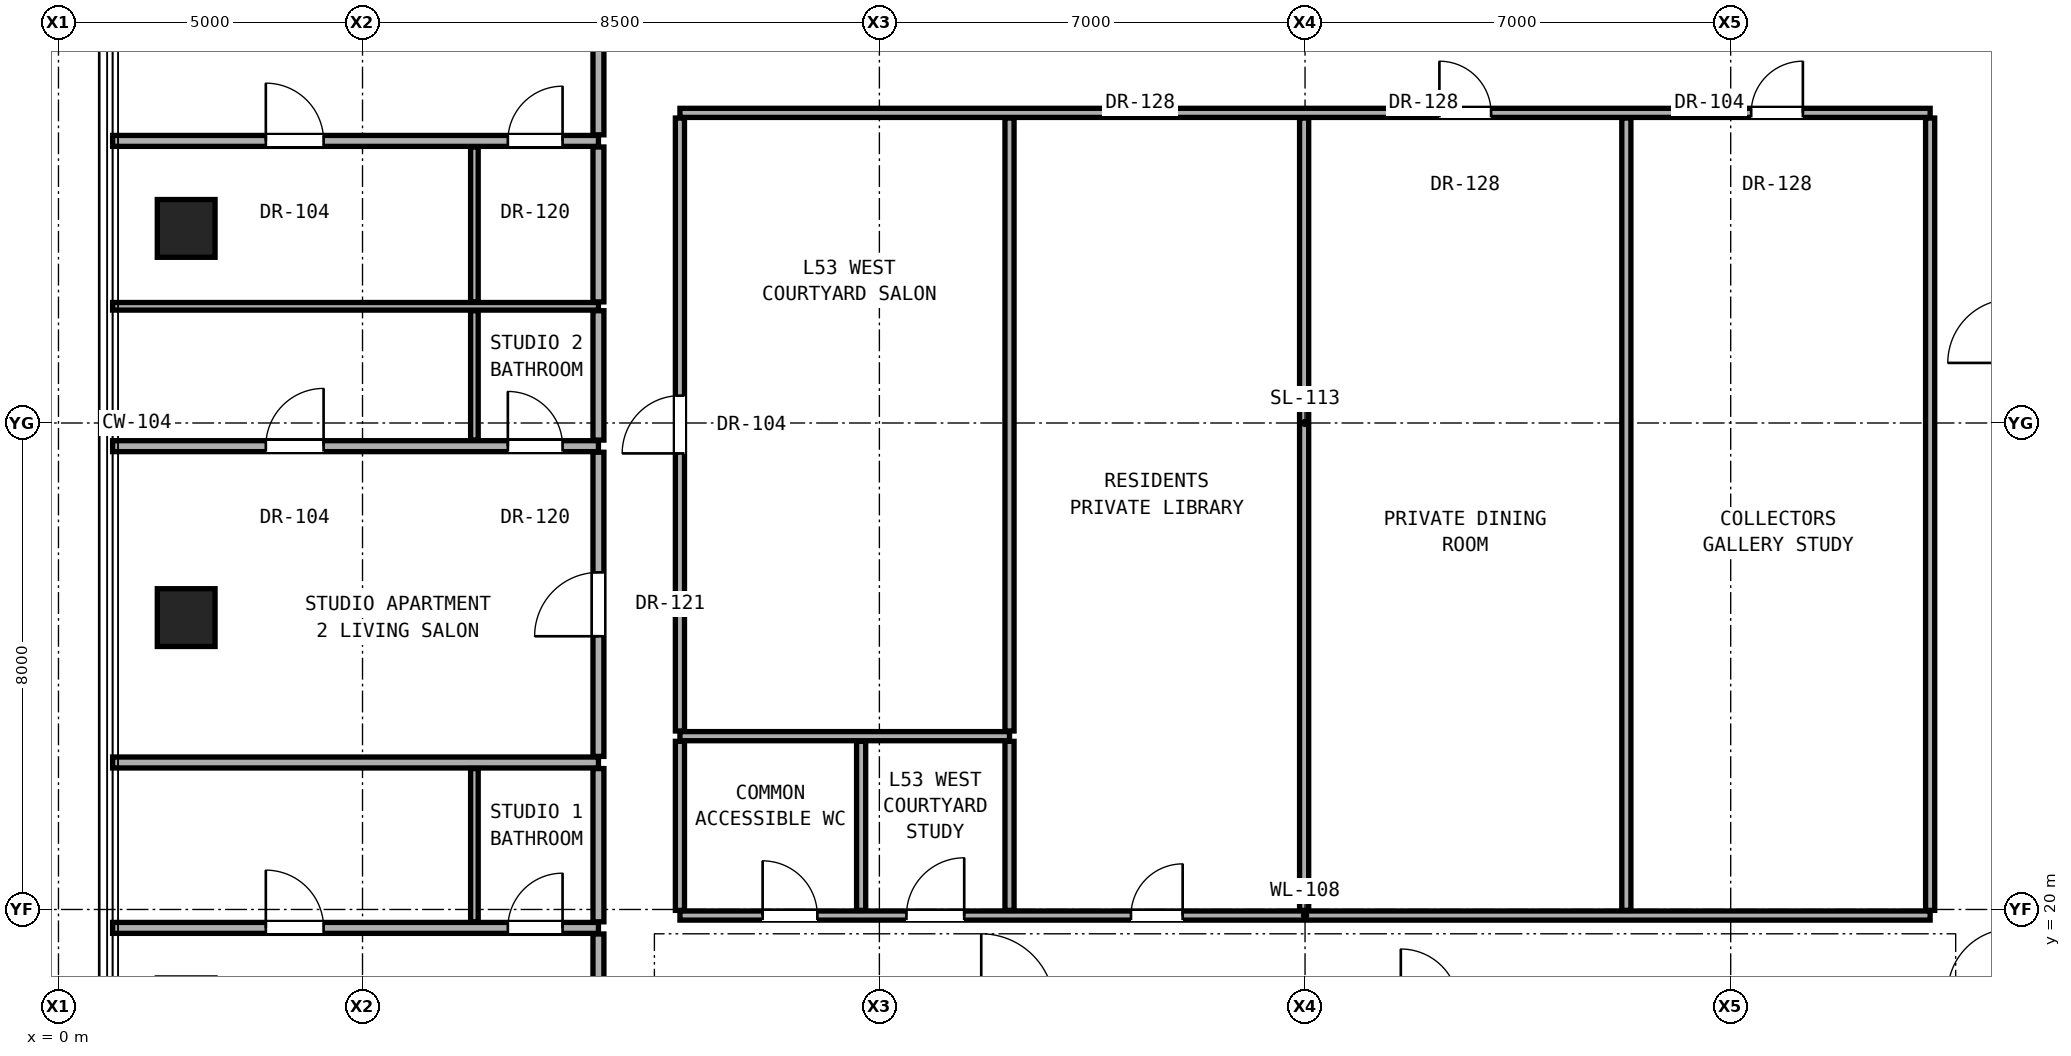
"""IFC4 building model, lengths in metres.
Left out: names, types, materials, properties, quantities, classifications, styles, units other than length and angle.
Written with IfcOpenShell. Run it as: python <this file> out.ifc"""

import sys

from ifc_helpers import new_model, si_unit, direction, frame, frame_2d, origin, origin_2d, place, context, subcontext, project, spatial, rectangle, hollow_rectangle, extrude, element, fill, save


model = new_model("IFC4")
c1 = context("Model", 3, precision=1e-05, world=origin(), true_north=direction((0.0, 1.0)))
c2 = subcontext(c1, "Body", "Model", "MODEL_VIEW")
j1 = project(units=[si_unit("LENGTHUNIT", "METRE"), si_unit("PLANEANGLEUNIT", "RADIAN")], contexts=[c1])
p1 = place(None, origin())
s1 = spatial("IfcSite", under=j1, at=p1, CompositionType="ELEMENT")
p2 = place(p1, origin())
s2 = spatial("IfcBuilding", under=s1, at=p2, CompositionType="ELEMENT")
p3 = place(p2, frame((0.0, 0.0, 186.9)))
s3 = spatial("IfcBuildingStorey", under=s2, at=p3, CompositionType="ELEMENT", Elevation=186.9)
for number, where, z_axis, x_axis in (
    (1, (2.1, 24.8, 0.0), (0.0, 0.0, 1.0), (1.0, 0.0, 0.0)),
    (2, (2.1, 31.2, 0.0), (0.0, 0.0, 1.0), (1.0, 0.0, 0.0)),
):
    element("IfcColumn", number, at=place(p3, frame(where, z_axis=z_axis, x_axis=x_axis)), inside=s3, PredefinedType="COLUMN", context=c2, shape_type="SweptSolid", body=[
        extrude(hollow_rectangle(XDim=0.95, YDim=0.95, WallThickness=0.05, at=origin_2d()), origin(), (0.0, 0.0, 1.0), 3.25),
    ])
p4 = place(p3, frame((0.89, 19.697, 0.0), z_axis=(0.0, 0.0, 1.0), x_axis=(1.0, 0.0, 0.0)))
e3 = element("IfcWall", 3, at=p4, inside=s3, PredefinedType="PARTITIONING", context=c2, shape_type="SweptSolid", body=[
    extrude(rectangle(XDim=7.99, YDim=0.18, at=frame_2d((3.995, 0.0))), origin(), (0.0, 0.0, 1.0), 2.269),
])
p5 = place(p4, frame((2.52, 0.0, 0.0)))
e4 = element("IfcOpeningElement", 4, at=p5, cuts=e3, PredefinedType="OPENING", context=c2, shape_type="SweptSolid", body=[
    extrude(rectangle(XDim=0.95, YDim=2.15, at=frame_2d((0.475, 1.075))), frame((0.0, 0.1, 0.0), z_axis=(0.0, -1.0, 0.0), x_axis=(1.0, 0.0, 0.0)), (0.0, 0.0, 1.0), 0.2),
])
p6 = place(p4, frame((6.5, 0.0, 0.0)))
e5 = element("IfcOpeningElement", 5, at=p6, cuts=e3, PredefinedType="OPENING", context=c2, shape_type="SweptSolid", body=[
    extrude(rectangle(XDim=0.9, YDim=2.1, at=frame_2d((0.45, 1.05))), frame((0.0, 0.1, 0.0), z_axis=(0.0, -1.0, 0.0), x_axis=(1.0, 0.0, 0.0)), (0.0, 0.0, 1.0), 0.2),
])
p7 = place(p3, frame((10.22, 19.9, 0.0), z_axis=(0.0, 0.0, 1.0), x_axis=(1.0, 0.0, 0.0)))
e6 = element("IfcWall", 6, at=p7, inside=s3, PredefinedType="PARTITIONING", context=c2, shape_type="SweptSolid", body=[
    extrude(rectangle(XDim=20.56, YDim=0.15, at=frame_2d((10.28, 0.0))), origin(), (0.0, 0.0, 1.0), 2.186),
])
p8 = place(p7, frame((1.36, 0.0, 0.0)))
e7 = element("IfcOpeningElement", 7, at=p8, cuts=e6, PredefinedType="OPENING", context=c2, shape_type="SweptSolid", body=[
    extrude(rectangle(XDim=0.9, YDim=2.1, at=frame_2d((0.45, 1.05))), frame((0.0, 0.085, 0.0), z_axis=(0.0, -1.0, 0.0), x_axis=(1.0, 0.0, 0.0)), (0.0, 0.0, 1.0), 0.17),
])
p9 = place(p7, frame((3.725, 0.0, 0.0)))
e8 = element("IfcOpeningElement", 8, at=p9, cuts=e6, PredefinedType="OPENING", context=c2, shape_type="SweptSolid", body=[
    extrude(rectangle(XDim=0.95, YDim=2.15, at=frame_2d((0.475, 1.075))), frame((0.0, 0.085, 0.0), z_axis=(0.0, -1.0, 0.0), x_axis=(1.0, 0.0, 0.0)), (0.0, 0.0, 1.0), 0.17),
])
p10 = place(p7, frame((7.417, 0.0, 0.0)))
e9 = element("IfcOpeningElement", 9, at=p10, cuts=e6, PredefinedType="OPENING", context=c2, shape_type="SweptSolid", body=[
    extrude(rectangle(XDim=0.85, YDim=2.01, at=frame_2d((0.425, 1.005))), frame((0.0, 0.085, 0.0), z_axis=(0.0, -1.0, 0.0), x_axis=(1.0, 0.0, 0.0)), (0.0, 0.0, 1.0), 0.17),
])
p11 = place(p3, frame((0.89, 22.417, 0.0), z_axis=(0.0, 0.0, 1.0), x_axis=(1.0, 0.0, 0.0)))
e10 = element("IfcWall", 10, at=p11, inside=s3, PredefinedType="PARTITIONING", context=c2, shape_type="SweptSolid", body=[
    extrude(rectangle(XDim=7.99, YDim=0.18, at=frame_2d((3.995, 0.0))), origin(), (0.0, 0.0, 1.0), 2.269),
])
p12 = place(p3, frame((10.22, 22.85, 0.0), z_axis=(0.0, 0.0, 1.0), x_axis=(1.0, 0.0, 0.0)))
e11 = element("IfcWall", 11, at=p12, inside=s3, PredefinedType="PARTITIONING", context=c2, shape_type="SweptSolid", body=[
    extrude(rectangle(XDim=5.42, YDim=0.15, at=frame_2d((2.71, 0.0))), origin(), (0.0, 0.0, 1.0), 2.186),
])
p13 = place(p3, frame((0.89, 27.619, 0.0), z_axis=(0.0, 0.0, 1.0), x_axis=(1.0, 0.0, 0.0)))
e12 = element("IfcWall", 12, at=p13, inside=s3, PredefinedType="PARTITIONING", context=c2, shape_type="SweptSolid", body=[
    extrude(rectangle(XDim=7.99, YDim=0.18, at=frame_2d((3.995, 0.0))), origin(), (0.0, 0.0, 1.0), 2.269),
])
p14 = place(p13, frame((2.52, 0.0, 0.0)))
e13 = element("IfcOpeningElement", 13, at=p14, cuts=e12, PredefinedType="OPENING", context=c2, shape_type="SweptSolid", body=[
    extrude(rectangle(XDim=0.95, YDim=2.15, at=frame_2d((0.475, 1.075))), frame((0.0, 0.1, 0.0), z_axis=(0.0, -1.0, 0.0), x_axis=(1.0, 0.0, 0.0)), (0.0, 0.0, 1.0), 0.2),
])
p15 = place(p13, frame((6.5, 0.0, 0.0)))
e14 = element("IfcOpeningElement", 14, at=p15, cuts=e12, PredefinedType="OPENING", context=c2, shape_type="SweptSolid", body=[
    extrude(rectangle(XDim=0.9, YDim=2.1, at=frame_2d((0.45, 1.05))), frame((0.0, 0.1, 0.0), z_axis=(0.0, -1.0, 0.0), x_axis=(1.0, 0.0, 0.0)), (0.0, 0.0, 1.0), 0.2),
])
p16 = place(p3, frame((0.89, 29.919, 0.0), z_axis=(0.0, 0.0, 1.0), x_axis=(1.0, 0.0, 0.0)))
e15 = element("IfcWall", 15, at=p16, inside=s3, PredefinedType="PARTITIONING", context=c2, shape_type="SweptSolid", body=[
    extrude(rectangle(XDim=7.99, YDim=0.125, at=frame_2d((3.995, 0.0))), origin(), (0.0, 0.0, 1.0), 2.269),
])
p17 = place(p3, frame((0.89, 32.639, 0.0), z_axis=(0.0, 0.0, 1.0), x_axis=(1.0, 0.0, 0.0)))
e16 = element("IfcWall", 16, at=p17, inside=s3, PredefinedType="PARTITIONING", context=c2, shape_type="SweptSolid", body=[
    extrude(rectangle(XDim=7.99, YDim=0.18, at=frame_2d((3.995, 0.0))), origin(), (0.0, 0.0, 1.0), 2.269),
])
p18 = place(p17, frame((2.52, 0.0, 0.0)))
e17 = element("IfcOpeningElement", 17, at=p18, cuts=e16, PredefinedType="OPENING", context=c2, shape_type="SweptSolid", body=[
    extrude(rectangle(XDim=0.95, YDim=2.15, at=frame_2d((0.475, 1.075))), frame((0.0, 0.1, 0.0), z_axis=(0.0, -1.0, 0.0), x_axis=(1.0, 0.0, 0.0)), (0.0, 0.0, 1.0), 0.2),
])
p19 = place(p17, frame((6.5, 0.0, 0.0)))
e18 = element("IfcOpeningElement", 18, at=p19, cuts=e16, PredefinedType="OPENING", context=c2, shape_type="SweptSolid", body=[
    extrude(rectangle(XDim=0.9, YDim=2.1, at=frame_2d((0.45, 1.05))), frame((0.0, 0.1, 0.0), z_axis=(0.0, -1.0, 0.0), x_axis=(1.0, 0.0, 0.0)), (0.0, 0.0, 1.0), 0.2),
])
p20 = place(p3, frame((10.22, 33.1, 0.0), z_axis=(0.0, 0.0, 1.0), x_axis=(1.0, 0.0, 0.0)))
e19 = element("IfcWall", 19, at=p20, inside=s3, PredefinedType="PARTITIONING", context=c2, shape_type="SweptSolid", body=[
    extrude(rectangle(XDim=20.56, YDim=0.15, at=frame_2d((10.28, 0.0))), origin(), (0.0, 0.0, 1.0), 2.186),
])
p21 = place(p20, frame((12.49, 0.0, 0.0)))
e20 = element("IfcOpeningElement", 20, at=p21, cuts=e19, PredefinedType="OPENING", context=c2, shape_type="SweptSolid", body=[
    extrude(rectangle(XDim=0.85, YDim=2.01, at=frame_2d((0.425, 1.005))), frame((0.0, 0.085, 0.0), z_axis=(0.0, -1.0, 0.0), x_axis=(1.0, 0.0, 0.0)), (0.0, 0.0, 1.0), 0.17),
])
p22 = place(p20, frame((17.617, 0.0, 0.0)))
e21 = element("IfcOpeningElement", 21, at=p22, cuts=e19, PredefinedType="OPENING", context=c2, shape_type="SweptSolid", body=[
    extrude(rectangle(XDim=0.85, YDim=2.01, at=frame_2d((0.425, 1.005))), frame((0.0, 0.085, 0.0), z_axis=(0.0, -1.0, 0.0), x_axis=(1.0, 0.0, 0.0)), (0.0, 0.0, 1.0), 0.17),
])
p23 = place(p3, frame((6.84, 19.797, 0.0), z_axis=(0.0, 0.0, 1.0), x_axis=(0.0, 1.0, 0.0)))
e22 = element("IfcWall", 22, at=p23, inside=s3, PredefinedType="PARTITIONING", context=c2, shape_type="SweptSolid", body=[
    extrude(rectangle(XDim=2.52, YDim=0.125, at=frame_2d((1.26, 0.0))), origin(), (0.0, 0.0, 1.0), 3.05),
])
p24 = place(p3, frame((6.84, 27.719, 0.0), z_axis=(0.0, 0.0, 1.0), x_axis=(0.0, 1.0, 0.0)))
e23 = element("IfcWall", 23, at=p24, inside=s3, PredefinedType="PARTITIONING", context=c2, shape_type="SweptSolid", body=[
    extrude(rectangle(XDim=2.127, YDim=0.125, at=frame_2d((1.064, 0.0))), origin(), (0.0, 0.0, 1.0), 3.05),
])
p25 = place(p3, frame((6.84, 29.991, 0.0), z_axis=(0.0, 0.0, 1.0), x_axis=(0.0, 1.0, 0.0)))
e24 = element("IfcWall", 24, at=p25, inside=s3, PredefinedType="PARTITIONING", context=c2, shape_type="SweptSolid", body=[
    extrude(rectangle(XDim=2.548, YDim=0.125, at=frame_2d((1.274, 0.0))), origin(), (0.0, 0.0, 1.0), 2.346),
])
p26 = place(p3, frame((8.88, 15.227, 0.0), z_axis=(0.0, 0.0, 1.0), x_axis=(0.0, 1.0, 0.0)))
e25 = element("IfcWall", 25, at=p26, inside=s3, PredefinedType="PARTITIONING", context=c2, shape_type="SweptSolid", body=[
    extrude(rectangle(XDim=4.37, YDim=0.18, at=frame_2d((2.185, 0.0))), origin(), (0.0, 0.0, 1.0), 2.442),
])
p27 = place(p26, frame((1.66, 0.0, 0.0)))
e26 = element("IfcOpeningElement", 26, at=p27, cuts=e25, PredefinedType="OPENING", context=c2, shape_type="SweptSolid", body=[
    extrude(rectangle(XDim=1.05, YDim=2.2, at=frame_2d((0.525, 1.1))), frame((0.0, 0.1, 0.0), z_axis=(0.0, -1.0, 0.0), x_axis=(1.0, 0.0, 0.0)), (0.0, 0.0, 1.0), 0.2),
])
p28 = place(p3, frame((8.88, 19.797, 0.0), z_axis=(0.0, 0.0, 1.0), x_axis=(0.0, 1.0, 0.0)))
e27 = element("IfcWall", 27, at=p28, inside=s3, PredefinedType="PARTITIONING", context=c2, shape_type="SweptSolid", body=[
    extrude(rectangle(XDim=2.52, YDim=0.18, at=frame_2d((1.26, 0.0))), origin(), (0.0, 0.0, 1.0), 3.05),
])
p29 = place(p3, frame((8.88, 22.517, 0.0), z_axis=(0.0, 0.0, 1.0), x_axis=(0.0, 1.0, 0.0)))
e28 = element("IfcWall", 28, at=p29, inside=s3, PredefinedType="PARTITIONING", context=c2, shape_type="SweptSolid", body=[
    extrude(rectangle(XDim=5.002, YDim=0.18, at=frame_2d((2.501, 0.0))), origin(), (0.0, 0.0, 1.0), 2.346),
])
p30 = place(p29, frame((1.976, 0.0, 0.0)))
e29 = element("IfcOpeningElement", 29, at=p30, cuts=e28, PredefinedType="OPENING", context=c2, shape_type="SweptSolid", body=[
    extrude(rectangle(XDim=1.05, YDim=2.2, at=frame_2d((0.525, 1.1))), frame((0.0, 0.1, 0.0), z_axis=(0.0, -1.0, 0.0), x_axis=(1.0, 0.0, 0.0)), (0.0, 0.0, 1.0), 0.2),
])
p31 = place(p3, frame((8.88, 27.719, 0.0), z_axis=(0.0, 0.0, 1.0), x_axis=(0.0, 1.0, 0.0)))
e30 = element("IfcWall", 30, at=p31, inside=s3, PredefinedType="PARTITIONING", context=c2, shape_type="SweptSolid", body=[
    extrude(rectangle(XDim=2.127, YDim=0.18, at=frame_2d((1.064, 0.0))), origin(), (0.0, 0.0, 1.0), 3.05),
])
p32 = place(p3, frame((8.88, 29.991, 0.0), z_axis=(0.0, 0.0, 1.0), x_axis=(0.0, 1.0, 0.0)))
e31 = element("IfcWall", 31, at=p32, inside=s3, PredefinedType="PARTITIONING", context=c2, shape_type="SweptSolid", body=[
    extrude(rectangle(XDim=2.548, YDim=0.18, at=frame_2d((1.274, 0.0))), origin(), (0.0, 0.0, 1.0), 2.346),
])
p33 = place(p3, frame((8.88, 32.739, 0.0), z_axis=(0.0, 0.0, 1.0), x_axis=(0.0, 1.0, 0.0)))
e32 = element("IfcWall", 32, at=p33, inside=s3, PredefinedType="PARTITIONING", context=c2, shape_type="SweptSolid", body=[
    extrude(rectangle(XDim=8.034, YDim=0.18, at=frame_2d((4.017, 0.0))), origin(), (0.0, 0.0, 1.0), 2.442),
])
p34 = place(p33, frame((3.492, 0.0, 0.0)))
e33 = element("IfcOpeningElement", 33, at=p34, cuts=e32, PredefinedType="OPENING", context=c2, shape_type="SweptSolid", body=[
    extrude(rectangle(XDim=1.05, YDim=2.2, at=frame_2d((0.525, 1.1))), frame((0.0, 0.1, 0.0), z_axis=(0.0, -1.0, 0.0), x_axis=(1.0, 0.0, 0.0)), (0.0, 0.0, 1.0), 0.2),
])
p35 = place(p3, frame((10.22, 19.985, 0.0), z_axis=(0.0, 0.0, 1.0), x_axis=(0.0, 1.0, 0.0)))
e34 = element("IfcWall", 34, at=p35, inside=s3, PredefinedType="PARTITIONING", context=c2, shape_type="SweptSolid", body=[
    extrude(rectangle(XDim=2.78, YDim=0.15, at=frame_2d((1.39, 0.0))), origin(), (0.0, 0.0, 1.0), 3.05),
])
p36 = place(p3, frame((10.22, 22.935, 0.0), z_axis=(0.0, 0.0, 1.0), x_axis=(0.0, 1.0, 0.0)))
e35 = element("IfcWall", 35, at=p36, inside=s3, PredefinedType="PARTITIONING", context=c2, shape_type="SweptSolid", body=[
    extrude(rectangle(XDim=10.08, YDim=0.15, at=frame_2d((5.04, 0.0))), origin(), (0.0, 0.0, 1.0), 2.346),
])
p37 = place(p36, frame((4.565, 0.0, 0.0)))
e36 = element("IfcOpeningElement", 36, at=p37, cuts=e35, PredefinedType="OPENING", context=c2, shape_type="SweptSolid", body=[
    extrude(rectangle(XDim=0.95, YDim=2.15, at=frame_2d((0.475, 1.075))), frame((0.0, 0.085, 0.0), z_axis=(0.0, -1.0, 0.0), x_axis=(1.0, 0.0, 0.0)), (0.0, 0.0, 1.0), 0.17),
])
p38 = place(p3, frame((13.2, 19.985, 0.0), z_axis=(0.0, 0.0, 1.0), x_axis=(0.0, 1.0, 0.0)))
e37 = element("IfcWall", 37, at=p38, inside=s3, PredefinedType="PARTITIONING", context=c2, shape_type="SweptSolid", body=[
    extrude(rectangle(XDim=2.78, YDim=0.15, at=frame_2d((1.39, 0.0))), origin(), (0.0, 0.0, 1.0), 3.05),
])
p39 = place(p3, frame((15.64, 19.985, 0.0), z_axis=(0.0, 0.0, 1.0), x_axis=(0.0, 1.0, 0.0)))
e38 = element("IfcWall", 38, at=p39, inside=s3, PredefinedType="PARTITIONING", context=c2, shape_type="SweptSolid", body=[
    extrude(rectangle(XDim=2.78, YDim=0.15, at=frame_2d((1.39, 0.0))), origin(), (0.0, 0.0, 1.0), 2.625),
])
p40 = place(p3, frame((15.64, 22.935, 0.0), z_axis=(0.0, 0.0, 1.0), x_axis=(0.0, 1.0, 0.0)))
e39 = element("IfcWall", 39, at=p40, inside=s3, PredefinedType="PARTITIONING", context=c2, shape_type="SweptSolid", body=[
    extrude(rectangle(XDim=10.08, YDim=0.15, at=frame_2d((5.04, 0.0))), origin(), (0.0, 0.0, 1.0), 2.186),
])
for number, where, z_axis, x_axis in (
    (40, (20.485, 19.985, 0.0), (0.0, 0.0, 1.0), (0.0, 1.0, 0.0)),
    (41, (25.784, 19.985, 0.0), (0.0, 0.0, 1.0), (0.0, 1.0, 0.0)),
):
    element("IfcWall", number, at=place(p3, frame(where, z_axis=z_axis, x_axis=x_axis)), inside=s3, PredefinedType="PARTITIONING", context=c2, shape_type="SweptSolid", body=[
        extrude(rectangle(XDim=13.03, YDim=0.15, at=frame_2d((6.515, 0.0))), origin(), (0.0, 0.0, 1.0), 2.186),
    ])
p41 = place(p3, frame((30.78, 19.985, 0.0), z_axis=(0.0, 0.0, 1.0), x_axis=(0.0, 1.0, 0.0)))
e42 = element("IfcWall", 42, at=p41, inside=s3, PredefinedType="PARTITIONING", context=c2, shape_type="SweptSolid", body=[
    extrude(rectangle(XDim=13.03, YDim=0.15, at=frame_2d((6.515, 0.0))), origin(), (0.0, 0.0, 1.0), 2.346),
])
p42 = place(p8, origin())
e43 = element("IfcDoor", 43, at=p42, inside=s3, OperationType="SINGLE_SWING_LEFT", PredefinedType="DOOR", context=c2, shape_type="SweptSolid", body=[
    extrude(rectangle(XDim=0.9, YDim=2.1, at=frame_2d((0.45, 1.05))), frame((0.0, 0.025, 0.0), z_axis=(0.0, -1.0, 0.0), x_axis=(1.0, 0.0, 0.0)), (0.0, 0.0, 1.0), 0.05),
])
fill(e7, e43)
p43 = place(p5, origin())
e44 = element("IfcDoor", 44, at=p43, inside=s3, OperationType="SINGLE_SWING_LEFT", PredefinedType="DOOR", context=c2, shape_type="SweptSolid", body=[
    extrude(rectangle(XDim=0.95, YDim=2.15, at=frame_2d((0.475, 1.075))), frame((0.0, 0.025, 0.0), z_axis=(0.0, -1.0, 0.0), x_axis=(1.0, 0.0, 0.0)), (0.0, 0.0, 1.0), 0.05),
])
fill(e4, e44)
p44 = place(p6, origin())
e45 = element("IfcDoor", 45, at=p44, inside=s3, OperationType="SINGLE_SWING_RIGHT", PredefinedType="DOOR", context=c2, shape_type="SweptSolid", body=[
    extrude(rectangle(XDim=0.9, YDim=2.1, at=frame_2d((0.45, 1.05))), frame((0.0, 0.025, 0.0), z_axis=(0.0, -1.0, 0.0), x_axis=(1.0, 0.0, 0.0)), (0.0, 0.0, 1.0), 0.05),
])
fill(e5, e45)
p45 = place(p30, origin())
e46 = element("IfcDoor", 46, at=p45, inside=s3, OperationType="SINGLE_SWING_LEFT", PredefinedType="DOOR", context=c2, shape_type="SweptSolid", body=[
    extrude(rectangle(XDim=1.05, YDim=2.2, at=frame_2d((0.525, 1.1))), frame((0.0, 0.025, 0.0), z_axis=(0.0, -1.0, 0.0), x_axis=(1.0, 0.0, 0.0)), (0.0, 0.0, 1.0), 0.05),
])
fill(e29, e46)
p46 = place(p14, origin())
e47 = element("IfcDoor", 47, at=p46, inside=s3, OperationType="SINGLE_SWING_RIGHT", PredefinedType="DOOR", context=c2, shape_type="SweptSolid", body=[
    extrude(rectangle(XDim=0.95, YDim=2.15, at=frame_2d((0.475, 1.075))), frame((0.0, 0.025, 0.0), z_axis=(0.0, -1.0, 0.0), x_axis=(1.0, 0.0, 0.0)), (0.0, 0.0, 1.0), 0.05),
])
fill(e13, e47)
p47 = place(p15, origin())
e48 = element("IfcDoor", 48, at=p47, inside=s3, OperationType="SINGLE_SWING_LEFT", PredefinedType="DOOR", context=c2, shape_type="SweptSolid", body=[
    extrude(rectangle(XDim=0.9, YDim=2.1, at=frame_2d((0.45, 1.05))), frame((0.0, 0.025, 0.0), z_axis=(0.0, -1.0, 0.0), x_axis=(1.0, 0.0, 0.0)), (0.0, 0.0, 1.0), 0.05),
])
fill(e14, e48)
p48 = place(p18, origin())
e49 = element("IfcDoor", 49, at=p48, inside=s3, OperationType="SINGLE_SWING_LEFT", PredefinedType="DOOR", context=c2, shape_type="SweptSolid", body=[
    extrude(rectangle(XDim=0.95, YDim=2.15, at=frame_2d((0.475, 1.075))), frame((0.0, 0.025, 0.0), z_axis=(0.0, -1.0, 0.0), x_axis=(1.0, 0.0, 0.0)), (0.0, 0.0, 1.0), 0.05),
])
fill(e17, e49)
p49 = place(p19, origin())
e50 = element("IfcDoor", 50, at=p49, inside=s3, OperationType="SINGLE_SWING_RIGHT", PredefinedType="DOOR", context=c2, shape_type="SweptSolid", body=[
    extrude(rectangle(XDim=0.9, YDim=2.1, at=frame_2d((0.45, 1.05))), frame((0.0, 0.025, 0.0), z_axis=(0.0, -1.0, 0.0), x_axis=(1.0, 0.0, 0.0)), (0.0, 0.0, 1.0), 0.05),
])
fill(e18, e50)
p50 = place(p9, origin())
e51 = element("IfcDoor", 51, at=p50, inside=s3, OperationType="SINGLE_SWING_RIGHT", PredefinedType="DOOR", context=c2, shape_type="SweptSolid", body=[
    extrude(rectangle(XDim=0.95, YDim=2.15, at=frame_2d((0.475, 1.075))), frame((0.0, 0.025, 0.0), z_axis=(0.0, -1.0, 0.0), x_axis=(1.0, 0.0, 0.0)), (0.0, 0.0, 1.0), 0.05),
])
fill(e8, e51)
p51 = place(p37, origin())
e52 = element("IfcDoor", 52, at=p51, inside=s3, OperationType="SINGLE_SWING_LEFT", PredefinedType="DOOR", context=c2, shape_type="SweptSolid", body=[
    extrude(rectangle(XDim=0.95, YDim=2.15, at=frame_2d((0.475, 1.075))), frame((0.0, 0.025, 0.0), z_axis=(0.0, -1.0, 0.0), x_axis=(1.0, 0.0, 0.0)), (0.0, 0.0, 1.0), 0.05),
])
fill(e36, e52)
p52 = place(p10, origin())
e53 = element("IfcDoor", 53, at=p52, inside=s3, OperationType="SINGLE_SWING_RIGHT", PredefinedType="DOOR", context=c2, shape_type="SweptSolid", body=[
    extrude(rectangle(XDim=0.85, YDim=2.01, at=frame_2d((0.425, 1.005))), frame((0.0, 0.025, 0.0), z_axis=(0.0, -1.0, 0.0), x_axis=(1.0, 0.0, 0.0)), (0.0, 0.0, 1.0), 0.05),
])
fill(e9, e53)
p53 = place(p21, origin())
e54 = element("IfcDoor", 54, at=p53, inside=s3, OperationType="SINGLE_SWING_LEFT", PredefinedType="DOOR", context=c2, shape_type="SweptSolid", body=[
    extrude(rectangle(XDim=0.85, YDim=2.01, at=frame_2d((0.425, 1.005))), frame((0.0, 0.025, 0.0), z_axis=(0.0, -1.0, 0.0), x_axis=(1.0, 0.0, 0.0)), (0.0, 0.0, 1.0), 0.05),
])
fill(e20, e54)
p54 = place(p22, origin())
e55 = element("IfcDoor", 55, at=p54, inside=s3, OperationType="SINGLE_SWING_RIGHT", PredefinedType="DOOR", context=c2, shape_type="SweptSolid", body=[
    extrude(rectangle(XDim=0.85, YDim=2.01, at=frame_2d((0.425, 1.005))), frame((0.0, 0.025, 0.0), z_axis=(0.0, -1.0, 0.0), x_axis=(1.0, 0.0, 0.0)), (0.0, 0.0, 1.0), 0.05),
])
fill(e21, e55)
save(model, sys.argv[1])
